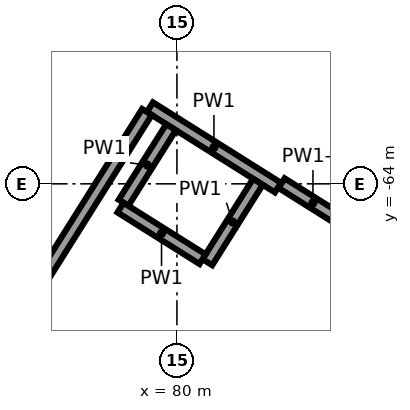
"""IFC4 building model, lengths in metres.
Left out: names, types, materials, properties, quantities, classifications, styles, units other than length and angle.
Written with IfcOpenShell. Run it as: python <this file> out.ifc"""

import sys

from ifc_helpers import new_model, si_unit, direction, frame, frame_2d, origin, origin_2d, place, context, subcontext, project, spatial, rectangle, circle, extrude, element, save


model = new_model("IFC4")
c1 = context("Model", 3, precision=1e-05, world=origin(), true_north=direction((0.0, 1.0)))
c2 = subcontext(c1, "Body", "Model", "MODEL_VIEW")
j1 = project(units=[si_unit("LENGTHUNIT", "METRE"), si_unit("PLANEANGLEUNIT", "RADIAN")], contexts=[c1])
p1 = place(None, origin())
s1 = spatial("IfcSite", under=j1, at=p1, CompositionType="ELEMENT")
p2 = place(p1, origin())
s2 = spatial("IfcBuilding", under=s1, at=p2, CompositionType="ELEMENT")
p3 = place(p2, frame((0.0, 0.0, 18.0)))
s3 = spatial("IfcBuildingStorey", under=s2, at=p3, CompositionType="ELEMENT", Elevation=18.0)
p4 = place(p3, frame((82.169, -63.034, 0.0), z_axis=(0.0, 0.0, 1.0), x_axis=(1.0, 0.0, 0.0)))
e1 = element("IfcColumn", 1, at=p4, inside=s3, PredefinedType="COLUMN", context=c2, shape_type="SweptSolid", body=[
    extrude(circle(Radius=0.5, at=origin_2d()), origin(), (0.0, 0.0, 1.0), 6.0),
])
p5 = place(p3, frame((81.329, -64.05, 0.0), z_axis=(0.0, 0.0, 1.0), x_axis=(-0.84670607735, 0.532060916229, 0.0)))
e2 = element("IfcWall", 2, at=p5, inside=s3, PredefinedType="PARTITIONING", context=c2, shape_type="SweptSolid", body=[
    extrude(rectangle(XDim=1.989, YDim=0.15, at=frame_2d((0.994, 0.0))), origin(), (0.0, 0.0, 1.0), 5.6),
])
p6 = place(p3, frame((79.605, -63.055, 0.0), z_axis=(0.0, 0.0, 1.0), x_axis=(-0.532032873767, -0.846723698281, 0.0)))
e3 = element("IfcWall", 3, at=p6, inside=s3, PredefinedType="PARTITIONING", context=c2, shape_type="SweptSolid", body=[
    extrude(rectangle(XDim=6.49, YDim=0.15, at=frame_2d((3.245, 0.0))), origin(), (0.0, 0.0, 1.0), 5.6),
])
p7 = place(p3, frame((80.401, -65.031, 0.0), z_axis=(0.0, 0.0, 1.0), x_axis=(0.532035438589, 0.846722086688, 0.0)))
e4 = element("IfcWall", 4, at=p7, inside=s3, PredefinedType="PARTITIONING", context=c2, shape_type="SweptSolid", body=[
    extrude(rectangle(XDim=1.249, YDim=0.15, at=frame_2d((0.625, 0.0))), origin(), (0.0, 0.0, 1.0), 5.6),
])
p8 = place(p3, frame((79.922, -63.255, 0.0), z_axis=(0.0, 0.0, 1.0), x_axis=(-0.531941549268, -0.846781074518, 0.0)))
e5 = element("IfcWall", 5, at=p8, inside=s3, PredefinedType="PARTITIONING", context=c2, shape_type="SweptSolid", body=[
    extrude(rectangle(XDim=1.174, YDim=0.15, at=frame_2d((0.587, 0.0))), origin(), (0.0, 0.0, 1.0), 5.6),
])
p9 = place(p3, frame((79.258, -64.313, 0.0), z_axis=(0.0, 0.0, 1.0), x_axis=(0.846769635862, -0.531959757672, 0.0)))
e6 = element("IfcWall", 6, at=p9, inside=s3, PredefinedType="PARTITIONING", context=c2, shape_type="SweptSolid", body=[
    extrude(rectangle(XDim=1.275, YDim=0.15, at=frame_2d((0.637, 0.0))), origin(), (0.0, 0.0, 1.0), 5.6),
])
p10 = place(p3, frame((82.202, -64.51, 0.0), z_axis=(0.0, 0.0, 1.0), x_axis=(-0.846630098311, 0.532181807876, 0.0)))
e7 = element("IfcWall", 7, at=p10, inside=s3, PredefinedType="PARTITIONING", context=c2, shape_type="SweptSolid", body=[
    extrude(rectangle(XDim=0.974, YDim=0.15, at=frame_2d((0.487, 0.0))), origin(), (0.0, 0.0, 1.0), 4.5),
])
save(model, sys.argv[1])
